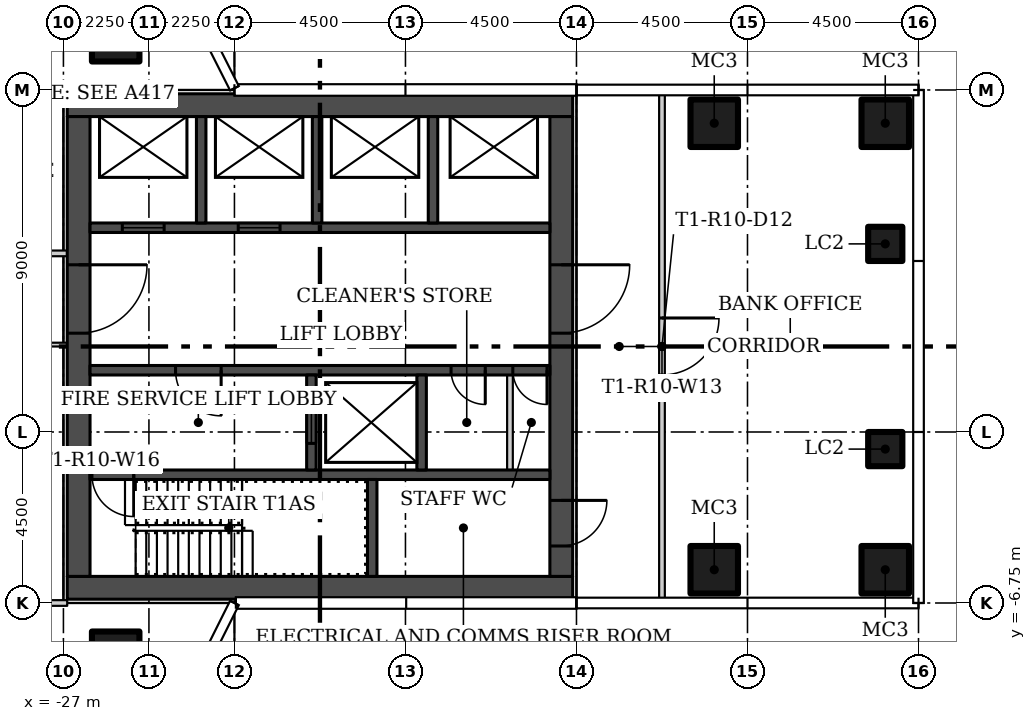
"""IFC4 building model, lengths in metres.
Left out: names, types, materials, properties, quantities, classifications, styles, units other than length and angle.
Written with IfcOpenShell. Run it as: python <this file> out.ifc"""

import sys

from ifc_helpers import new_model, si_unit, direction, frame, frame_2d, origin, origin_2d, place, context, subcontext, project, spatial, rectangle, hollow_rectangle, extrude, element, fill, save


model = new_model("IFC4")
c1 = context("Model", 3, precision=1e-05, world=origin(), true_north=direction((0.0, 1.0)))
c2 = subcontext(c1, "Body", "Model", "MODEL_VIEW")
j1 = project(units=[si_unit("LENGTHUNIT", "METRE"), si_unit("PLANEANGLEUNIT", "RADIAN")], contexts=[c1])
p1 = place(None, origin())
s1 = spatial("IfcSite", under=j1, at=p1, CompositionType="ELEMENT")
p2 = place(p1, origin())
s2 = spatial("IfcBuilding", under=s1, at=p2, CompositionType="ELEMENT")
p3 = place(p2, frame((0.0, 0.0, 101.4)))
s3 = spatial("IfcBuildingStorey", under=s2, at=p3, CompositionType="ELEMENT", Elevation=101.4)
for number, where in (
    (1, (-25.625, 8.125, 0.0)),
    (2, (-25.625, -8.125, 0.0)),
    (3, (-9.875, -5.875, 0.0)),
    (4, (-5.375, -5.875, 0.0)),
    (5, (-9.875, 5.875, 0.0)),
    (6, (-5.375, 5.875, 0.0)),
):
    element("IfcColumn", number, at=place(p3, frame(where)), inside=s3, PredefinedType="COLUMN", context=c2, shape_type="SweptSolid", body=[
        extrude(hollow_rectangle(XDim=1.25, YDim=1.25, WallThickness=0.05, at=origin_2d()), origin(), (0.0, 0.0, 1.0), 3.55),
    ])
for number, where in (
    (7, (-5.375, -2.7, 0.0)),
    (8, (-5.375, 2.7, 0.0)),
):
    element("IfcColumn", number, at=place(p3, frame(where)), inside=s3, PredefinedType="COLUMN", context=c2, shape_type="SweptSolid", body=[
        extrude(hollow_rectangle(XDim=0.9, YDim=0.9, WallThickness=0.036, at=origin_2d()), origin(), (0.0, 0.0, 1.0), 3.55),
    ])
p4 = place(p3, frame((-32.925, 2.45, 0.0)))
e9 = element("IfcWall", 9, at=p4, inside=s3, PredefinedType="PARTITIONING", context=c2, shape_type="SweptSolid", body=[
    extrude(rectangle(XDim=6.025, YDim=0.15, at=frame_2d((3.012, 0.0))), origin(), (0.0, 0.0, 1.0), 3.55),
])
p5 = place(p4, frame((2.55, 0.0, 0.0)))
e10 = element("IfcOpeningElement", 10, at=p5, cuts=e9, PredefinedType="OPENING", context=c2, shape_type="SweptSolid", body=[
    extrude(rectangle(XDim=0.9, YDim=2.1, at=frame_2d((0.45, 1.05))), frame((0.0, 0.085, 0.0), z_axis=(0.0, -1.0, 0.0), x_axis=(1.0, 0.0, 0.0)), (0.0, 0.0, 1.0), 0.17),
])
p6 = place(p3, frame((-26.9, 0.05, 0.0), z_axis=(0.0, 0.0, 1.0), x_axis=(-1.0, 0.0, 0.0)))
e11 = element("IfcWall", 11, at=p6, inside=s3, PredefinedType="PARTITIONING", context=c2, shape_type="SweptSolid", body=[
    extrude(rectangle(XDim=6.0, YDim=0.1, at=frame_2d((3.0, 0.0))), origin(), (0.0, 0.0, 1.0), 3.55),
])
p7 = place(p6, frame((2.575, 0.0, 0.0)))
e12 = element("IfcOpeningElement", 12, at=p7, cuts=e11, PredefinedType="OPENING", context=c2, shape_type="SweptSolid", body=[
    extrude(rectangle(XDim=0.9, YDim=2.1, at=frame_2d((0.45, 1.05))), frame((0.0, 0.06, 0.0), z_axis=(0.0, -1.0, 0.0), x_axis=(1.0, 0.0, 0.0)), (0.0, 0.0, 1.0), 0.12),
])
p8 = place(p3, frame((-11.25, 6.655, 0.0), z_axis=(0.0, 0.0, 1.0), x_axis=(0.0, -1.0, 0.0)))
e13 = element("IfcWall", 13, at=p8, inside=s3, PredefinedType="PARTITIONING", context=c2, shape_type="SweptSolid", body=[
    extrude(rectangle(XDim=13.31, YDim=0.15, at=frame_2d((6.655, 0.0))), origin(), (0.0, 0.0, 1.0), 3.55),
])
p9 = place(p8, frame((5.905, 0.0, 0.0)))
e14 = element("IfcOpeningElement", 14, at=p9, cuts=e13, PredefinedType="OPENING", context=c2, shape_type="SweptSolid", body=[
    extrude(rectangle(XDim=1.5, YDim=2.1, at=frame_2d((0.75, 1.05))), frame((0.0, 0.085, 0.0), z_axis=(0.0, -1.0, 0.0), x_axis=(1.0, 0.0, 0.0)), (0.0, 0.0, 1.0), 0.17),
])
p10 = place(p3, frame((-26.9, 6.75, 0.0), z_axis=(0.0, 0.0, 1.0), x_axis=(-1.0, 0.0, 0.0)))
e15 = element("IfcWall", 15, at=p10, inside=s3, PredefinedType="PARTITIONING", context=c2, shape_type="SweptSolid", body=[
    extrude(rectangle(XDim=5.875, YDim=0.15, at=frame_2d((2.938, 0.0))), origin(), (0.0, 0.0, 1.0), 3.55),
])
p11 = place(p3, frame((-26.9, -3.0, 0.0), z_axis=(0.0, 0.0, 1.0), x_axis=(-1.0, 0.0, 0.0)))
e16 = element("IfcWall", 16, at=p11, inside=s3, PredefinedType="PARTITIONING", context=c2, shape_type="SweptSolid", body=[
    extrude(rectangle(XDim=5.9, YDim=0.1, at=frame_2d((2.95, 0.0))), origin(), (0.0, 0.0, 1.0), 3.55),
])
p12 = place(p3, frame((-32.925, -6.75, 0.0)))
e17 = element("IfcWall", 17, at=p12, inside=s3, PredefinedType="PARTITIONING", context=c2, shape_type="SweptSolid", body=[
    extrude(rectangle(XDim=6.025, YDim=0.15, at=frame_2d((3.012, 0.0))), origin(), (0.0, 0.0, 1.0), 3.55),
])
for number, where in (
    (18, (-26.9, -6.35, 0.0)),
    (19, (-26.9, 6.35, 0.0)),
):
    element("IfcWall", number, at=place(p3, frame(where)), inside=s3, PredefinedType="SHEAR", context=c2, shape_type="SweptSolid", body=[
        extrude(rectangle(XDim=13.3, YDim=0.6, at=frame_2d((6.65, 0.0))), origin(), (0.0, 0.0, 1.0), 3.55),
    ])
p13 = place(p3, frame((-26.6, 6.05, 0.0), z_axis=(0.0, 0.0, 1.0), x_axis=(0.0, -1.0, 0.0)))
e20 = element("IfcWall", 20, at=p13, inside=s3, PredefinedType="SHEAR", context=c2, shape_type="SweptSolid", body=[
    extrude(rectangle(XDim=12.1, YDim=0.6, at=frame_2d((6.05, 0.0))), origin(), (0.0, 0.0, 1.0), 3.55),
])
p14 = place(p13, frame((3.9, 0.0, 0.0)))
e21 = element("IfcOpeningElement", 21, at=p14, cuts=e20, PredefinedType="OPENING", context=c2, shape_type="SweptSolid", body=[
    extrude(rectangle(XDim=1.8, YDim=2.4, at=frame_2d((0.9, 1.2))), frame((0.0, 0.31, 0.0), z_axis=(0.0, -1.0, 0.0), x_axis=(1.0, 0.0, 0.0)), (0.0, 0.0, 1.0), 0.62),
])
p15 = place(p3, frame((-13.9, 6.05, 0.0), z_axis=(0.0, 0.0, 1.0), x_axis=(0.0, -1.0, 0.0)))
e22 = element("IfcWall", 22, at=p15, inside=s3, PredefinedType="SHEAR", context=c2, shape_type="SweptSolid", body=[
    extrude(rectangle(XDim=12.1, YDim=0.6, at=frame_2d((6.05, 0.0))), origin(), (0.0, 0.0, 1.0), 3.55),
])
p16 = place(p15, frame((10.1, 0.0, 0.0)))
e23 = element("IfcOpeningElement", 23, at=p16, cuts=e22, PredefinedType="OPENING", context=c2, shape_type="SweptSolid", body=[
    extrude(rectangle(XDim=1.2, YDim=2.1, at=frame_2d((0.6, 1.05))), frame((0.0, 0.31, 0.0), z_axis=(0.0, -1.0, 0.0), x_axis=(1.0, 0.0, 0.0)), (0.0, 0.0, 1.0), 0.62),
])
p17 = place(p15, frame((3.9, 0.0, 0.0)))
e24 = element("IfcOpeningElement", 24, at=p17, cuts=e22, PredefinedType="OPENING", context=c2, shape_type="SweptSolid", body=[
    extrude(rectangle(XDim=1.8, YDim=2.4, at=frame_2d((0.9, 1.2))), frame((0.0, 0.31, 0.0), z_axis=(0.0, -1.0, 0.0), x_axis=(1.0, 0.0, 0.0)), (0.0, 0.0, 1.0), 0.62),
])
p18 = place(p3, frame((-14.2, -3.375, 0.0), z_axis=(0.0, 0.0, 1.0), x_axis=(-1.0, 0.0, 0.0)))
e25 = element("IfcWall", 25, at=p18, inside=s3, PredefinedType="SHEAR", context=c2, shape_type="SweptSolid", body=[
    extrude(rectangle(XDim=12.1, YDim=0.25, at=frame_2d((6.05, 0.0))), origin(), (0.0, 0.0, 1.0), 3.55),
])
p19 = place(p18, frame((10.95, 0.0, 0.0)))
e26 = element("IfcOpeningElement", 26, at=p19, cuts=e25, PredefinedType="OPENING", context=c2, shape_type="SweptSolid", body=[
    extrude(rectangle(XDim=1.1, YDim=2.1, at=frame_2d((0.55, 1.05))), frame((0.0, 0.135, 0.0), z_axis=(0.0, -1.0, 0.0), x_axis=(1.0, 0.0, 0.0)), (0.0, 0.0, 1.0), 0.27),
])
p20 = place(p3, frame((-18.875, -6.05, 0.0), z_axis=(0.0, 0.0, 1.0), x_axis=(0.0, 1.0, 0.0)))
e27 = element("IfcWall", 27, at=p20, inside=s3, PredefinedType="SHEAR", context=c2, shape_type="SweptSolid", body=[
    extrude(rectangle(XDim=2.55, YDim=0.25, at=frame_2d((1.275, 0.0))), origin(), (0.0, 0.0, 1.0), 3.55),
])
p21 = place(p3, frame((-14.2, -0.625, 0.0), z_axis=(0.0, 0.0, 1.0), x_axis=(-1.0, 0.0, 0.0)))
e28 = element("IfcWall", 28, at=p21, inside=s3, PredefinedType="SHEAR", context=c2, shape_type="SweptSolid", body=[
    extrude(rectangle(XDim=12.1, YDim=0.25, at=frame_2d((6.05, 0.0))), origin(), (0.0, 0.0, 1.0), 3.55),
])
p22 = place(p21, frame((8.65, 0.0, 0.0)))
e29 = element("IfcOpeningElement", 29, at=p22, cuts=e28, PredefinedType="OPENING", context=c2, shape_type="SweptSolid", body=[
    extrude(rectangle(XDim=1.2, YDim=2.1, at=frame_2d((0.6, 1.05))), frame((0.0, 0.135, 0.0), z_axis=(0.0, -1.0, 0.0), x_axis=(1.0, 0.0, 0.0)), (0.0, 0.0, 1.0), 0.27),
])
p23 = place(p21, frame((1.7, 0.0, 0.0)))
e30 = element("IfcOpeningElement", 30, at=p23, cuts=e28, PredefinedType="OPENING", context=c2, shape_type="SweptSolid", body=[
    extrude(rectangle(XDim=0.9, YDim=2.1, at=frame_2d((0.45, 1.05))), frame((0.0, 0.135, 0.0), z_axis=(0.0, -1.0, 0.0), x_axis=(1.0, 0.0, 0.0)), (0.0, 0.0, 1.0), 0.27),
])
p24 = place(p21, frame((0.075, 0.0, 0.0)))
e31 = element("IfcOpeningElement", 31, at=p24, cuts=e28, PredefinedType="OPENING", context=c2, shape_type="SweptSolid", body=[
    extrude(rectangle(XDim=0.9, YDim=2.1, at=frame_2d((0.45, 1.05))), frame((0.0, 0.135, 0.0), z_axis=(0.0, -1.0, 0.0), x_axis=(1.0, 0.0, 0.0)), (0.0, 0.0, 1.0), 0.27),
])
p25 = place(p3, frame((-20.475, -3.25, 0.0), z_axis=(0.0, 0.0, 1.0), x_axis=(0.0, 1.0, 0.0)))
e32 = element("IfcWall", 32, at=p25, inside=s3, PredefinedType="SHEAR", context=c2, shape_type="SweptSolid", body=[
    extrude(rectangle(XDim=2.5, YDim=0.25, at=frame_2d((1.25, 0.0))), origin(), (0.0, 0.0, 1.0), 3.55),
])
p26 = place(p25, frame((0.7, 0.0, 0.0)))
e33 = element("IfcOpeningElement", 33, at=p26, cuts=e32, PredefinedType="OPENING", context=c2, shape_type="SweptSolid", body=[
    extrude(rectangle(XDim=1.1, YDim=2.1, at=frame_2d((0.55, 1.05))), frame((0.0, 0.135, 0.0), z_axis=(0.0, -1.0, 0.0), x_axis=(1.0, 0.0, 0.0)), (0.0, 0.0, 1.0), 0.27),
])
p27 = place(p3, frame((-17.575, -3.25, 0.0), z_axis=(0.0, 0.0, 1.0), x_axis=(0.0, 1.0, 0.0)))
e34 = element("IfcWall", 34, at=p27, inside=s3, PredefinedType="SHEAR", context=c2, shape_type="SweptSolid", body=[
    extrude(rectangle(XDim=2.5, YDim=0.25, at=frame_2d((1.25, 0.0))), origin(), (0.0, 0.0, 1.0), 3.55),
])
p28 = place(p3, frame((-15.25, -3.25, 0.0), z_axis=(0.0, 0.0, 1.0), x_axis=(0.0, 1.0, 0.0)))
e35 = element("IfcWall", 35, at=p28, inside=s3, PredefinedType="PARTITIONING", context=c2, shape_type="SweptSolid", body=[
    extrude(rectangle(XDim=2.5, YDim=0.15, at=frame_2d((1.25, 0.0))), origin(), (0.0, 0.0, 1.0), 3.55),
])
p29 = place(p3, frame((-26.3, 3.125, 0.0)))
e36 = element("IfcWall", 36, at=p29, inside=s3, PredefinedType="SHEAR", context=c2, shape_type="SweptSolid", body=[
    extrude(rectangle(XDim=12.1, YDim=0.25, at=frame_2d((6.05, 0.0))), origin(), (0.0, 0.0, 1.0), 3.55),
])
p30 = place(p29, frame((0.85, 0.0, 0.0)))
e37 = element("IfcOpeningElement", 37, at=p30, cuts=e36, PredefinedType="OPENING", context=c2, shape_type="SweptSolid", body=[
    extrude(rectangle(XDim=1.1, YDim=2.1, at=frame_2d((0.55, 1.05))), frame((0.0, 0.135, 0.0), z_axis=(0.0, -1.0, 0.0), x_axis=(1.0, 0.0, 0.0)), (0.0, 0.0, 1.0), 0.27),
])
p31 = place(p29, frame((3.9, 0.0, 0.0)))
e38 = element("IfcOpeningElement", 38, at=p31, cuts=e36, PredefinedType="OPENING", context=c2, shape_type="SweptSolid", body=[
    extrude(rectangle(XDim=1.1, YDim=2.1, at=frame_2d((0.55, 1.05))), frame((0.0, 0.135, 0.0), z_axis=(0.0, -1.0, 0.0), x_axis=(1.0, 0.0, 0.0)), (0.0, 0.0, 1.0), 0.27),
])
for number, where, z_axis, x_axis in (
    (39, (-23.375, 3.25, 0.0), (0.0, 0.0, 1.0), (0.0, 1.0, 0.0)),
    (40, (-20.325, 3.25, 0.0), (0.0, 0.0, 1.0), (0.0, 1.0, 0.0)),
    (41, (-17.275, 3.25, 0.0), (0.0, 0.0, 1.0), (0.0, 1.0, 0.0)),
):
    element("IfcWall", number, at=place(p3, frame(where, z_axis=z_axis, x_axis=x_axis)), inside=s3, PredefinedType="SHEAR", context=c2, shape_type="SweptSolid", body=[
        extrude(rectangle(XDim=2.8, YDim=0.25, at=frame_2d((1.4, 0.0))), origin(), (0.0, 0.0, 1.0), 3.55),
    ])
p32 = place(p9, origin())
e42 = element("IfcDoor", 42, at=p32, inside=s3, OperationType="DOUBLE_DOOR_SINGLE_SWING", PredefinedType="DOOR", context=c2, shape_type="SweptSolid", body=[
    extrude(rectangle(XDim=1.5, YDim=2.1, at=frame_2d((0.75, 1.05))), frame((0.0, 0.025, 0.0), z_axis=(0.0, -1.0, 0.0), x_axis=(1.0, 0.0, 0.0)), (0.0, 0.0, 1.0), 0.05),
])
fill(e14, e42)
p33 = place(p14, origin())
e43 = element("IfcDoor", 43, at=p33, inside=s3, OperationType="DOUBLE_DOOR_SINGLE_SWING", PredefinedType="DOOR", context=c2, shape_type="SweptSolid", body=[
    extrude(rectangle(XDim=1.8, YDim=2.4, at=frame_2d((0.9, 1.2))), frame((0.0, 0.025, 0.0), z_axis=(0.0, -1.0, 0.0), x_axis=(1.0, 0.0, 0.0)), (0.0, 0.0, 1.0), 0.05),
])
fill(e21, e43)
p34 = place(p16, origin())
e44 = element("IfcDoor", 44, at=p34, inside=s3, OperationType="SINGLE_SWING_RIGHT", PredefinedType="DOOR", context=c2, shape_type="SweptSolid", body=[
    extrude(rectangle(XDim=1.2, YDim=2.1, at=frame_2d((0.6, 1.05))), frame((0.0, 0.025, 0.0), z_axis=(0.0, -1.0, 0.0), x_axis=(1.0, 0.0, 0.0)), (0.0, 0.0, 1.0), 0.05),
])
fill(e23, e44)
p35 = place(p17, origin())
e45 = element("IfcDoor", 45, at=p35, inside=s3, OperationType="DOUBLE_DOOR_SINGLE_SWING", PredefinedType="DOOR", context=c2, shape_type="SweptSolid", body=[
    extrude(rectangle(XDim=1.8, YDim=2.4, at=frame_2d((0.9, 1.2))), frame((0.0, 0.025, 0.0), z_axis=(0.0, -1.0, 0.0), x_axis=(1.0, 0.0, 0.0)), (0.0, 0.0, 1.0), 0.05),
])
fill(e24, e45)
p36 = place(p19, origin())
e46 = element("IfcDoor", 46, at=p36, inside=s3, OperationType="SINGLE_SWING_RIGHT", PredefinedType="DOOR", context=c2, shape_type="SweptSolid", body=[
    extrude(rectangle(XDim=1.1, YDim=2.1, at=frame_2d((0.55, 1.05))), frame((0.0, 0.025, 0.0), z_axis=(0.0, -1.0, 0.0), x_axis=(1.0, 0.0, 0.0)), (0.0, 0.0, 1.0), 0.05),
])
fill(e26, e46)
p37 = place(p22, origin())
e47 = element("IfcDoor", 47, at=p37, inside=s3, OperationType="SINGLE_SWING_RIGHT", PredefinedType="DOOR", context=c2, shape_type="SweptSolid", body=[
    extrude(rectangle(XDim=1.2, YDim=2.1, at=frame_2d((0.6, 1.05))), frame((0.0, 0.025, 0.0), z_axis=(0.0, -1.0, 0.0), x_axis=(1.0, 0.0, 0.0)), (0.0, 0.0, 1.0), 0.05),
])
fill(e29, e47)
p38 = place(p23, origin())
e48 = element("IfcDoor", 48, at=p38, inside=s3, OperationType="SINGLE_SWING_LEFT", PredefinedType="DOOR", context=c2, shape_type="SweptSolid", body=[
    extrude(rectangle(XDim=0.9, YDim=2.1, at=frame_2d((0.45, 1.05))), frame((0.0, 0.025, 0.0), z_axis=(0.0, -1.0, 0.0), x_axis=(1.0, 0.0, 0.0)), (0.0, 0.0, 1.0), 0.05),
])
fill(e30, e48)
p39 = place(p24, origin())
e49 = element("IfcDoor", 49, at=p39, inside=s3, OperationType="SINGLE_SWING_LEFT", PredefinedType="DOOR", context=c2, shape_type="SweptSolid", body=[
    extrude(rectangle(XDim=0.9, YDim=2.1, at=frame_2d((0.45, 1.05))), frame((0.0, 0.025, 0.0), z_axis=(0.0, -1.0, 0.0), x_axis=(1.0, 0.0, 0.0)), (0.0, 0.0, 1.0), 0.05),
])
fill(e31, e49)
p40 = place(p26, origin())
e50 = element("IfcDoor", 50, at=p40, inside=s3, OperationType="SLIDING_TO_LEFT", PredefinedType="DOOR", context=c2, shape_type="SweptSolid", body=[
    extrude(rectangle(XDim=1.1, YDim=2.1, at=frame_2d((0.55, 1.05))), frame((0.0, 0.025, 0.0), z_axis=(0.0, -1.0, 0.0), x_axis=(1.0, 0.0, 0.0)), (0.0, 0.0, 1.0), 0.05),
])
fill(e33, e50)
p41 = place(p30, origin())
e51 = element("IfcDoor", 51, at=p41, inside=s3, OperationType="SLIDING_TO_LEFT", PredefinedType="DOOR", context=c2, shape_type="SweptSolid", body=[
    extrude(rectangle(XDim=1.1, YDim=2.1, at=frame_2d((0.55, 1.05))), frame((0.0, 0.025, 0.0), z_axis=(0.0, -1.0, 0.0), x_axis=(1.0, 0.0, 0.0)), (0.0, 0.0, 1.0), 0.05),
])
fill(e37, e51)
p42 = place(p31, origin())
e52 = element("IfcDoor", 52, at=p42, inside=s3, OperationType="SLIDING_TO_LEFT", PredefinedType="DOOR", context=c2, shape_type="SweptSolid", body=[
    extrude(rectangle(XDim=1.1, YDim=2.1, at=frame_2d((0.55, 1.05))), frame((0.0, 0.025, 0.0), z_axis=(0.0, -1.0, 0.0), x_axis=(1.0, 0.0, 0.0)), (0.0, 0.0, 1.0), 0.05),
])
fill(e38, e52)
save(model, sys.argv[1])
